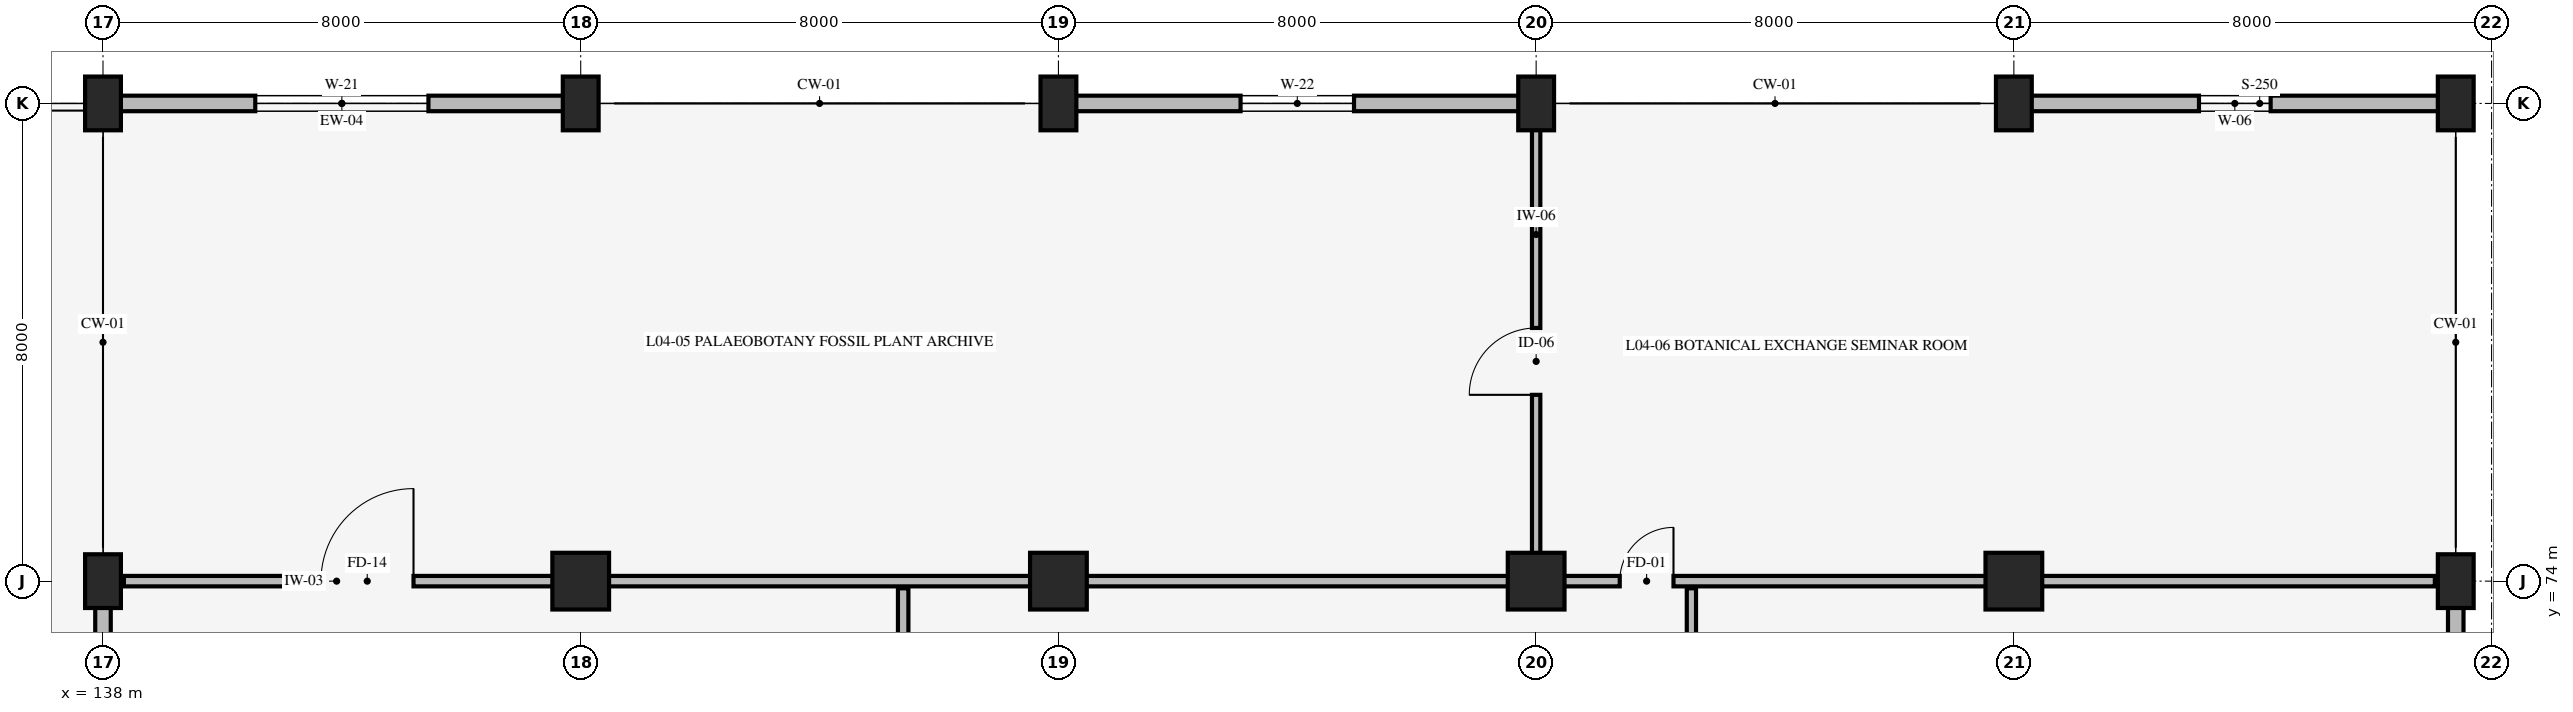
"""IFC4 building model, lengths in metres.
Left out: names, types, materials, properties, quantities, classifications, styles, units other than length and angle.
Written with IfcOpenShell. Run it as: python <this file> out.ifc"""

import sys

from ifc_helpers import new_model, si_unit, direction, frame, frame_2d, origin, origin_2d, place, context, subcontext, project, spatial, rectangle, extrude, element, fill, save


model = new_model("IFC4")
c1 = context("Model", 3, precision=1e-05, world=origin(), true_north=direction((0.0, 1.0)))
c2 = subcontext(c1, "Body", "Model", "MODEL_VIEW")
j1 = project(units=[si_unit("LENGTHUNIT", "METRE"), si_unit("PLANEANGLEUNIT", "RADIAN")], contexts=[c1])
p1 = place(None, origin())
s1 = spatial("IfcSite", under=j1, at=p1, CompositionType="ELEMENT")
p2 = place(p1, origin())
s2 = spatial("IfcBuilding", under=s1, at=p2, CompositionType="ELEMENT")
p3 = place(p2, frame((0.0, 0.0, 15.0)))
s3 = spatial("IfcBuildingStorey", under=s2, at=p3, CompositionType="ELEMENT", Elevation=15.0)
for number, where, z_axis, x_axis in (
    (1, (138.0, 74.0, 0.0), (0.0, 0.0, 1.0), (1.0, 0.0, 0.0)),
    (2, (138.0, 82.0, 0.0), (0.0, 0.0, 1.0), (1.0, 0.0, 0.0)),
):
    element("IfcColumn", number, at=place(p3, frame(where, z_axis=z_axis, x_axis=x_axis)), inside=s3, PredefinedType="COLUMN", context=c2, shape_type="SweptSolid", body=[
        extrude(rectangle(XDim=0.6, YDim=0.9, at=origin_2d()), origin(), (0.0, 0.0, 1.0), 4.2),
    ])
p4 = place(p3, frame((146.0, 74.0, 0.0), z_axis=(0.0, 0.0, 1.0), x_axis=(1.0, 0.0, 0.0)))
e3 = element("IfcColumn", 3, at=p4, inside=s3, PredefinedType="COLUMN", context=c2, shape_type="SweptSolid", body=[
    extrude(rectangle(XDim=0.95, YDim=0.95, at=origin_2d()), origin(), (0.0, 0.0, 1.0), 4.2),
])
p5 = place(p3, frame((146.0, 82.0, 0.0), z_axis=(0.0, 0.0, 1.0), x_axis=(1.0, 0.0, 0.0)))
e4 = element("IfcColumn", 4, at=p5, inside=s3, PredefinedType="COLUMN", context=c2, shape_type="SweptSolid", body=[
    extrude(rectangle(XDim=0.6, YDim=0.9, at=origin_2d()), origin(), (0.0, 0.0, 1.0), 4.2),
])
p6 = place(p3, frame((154.0, 74.0, 0.0), z_axis=(0.0, 0.0, 1.0), x_axis=(1.0, 0.0, 0.0)))
e5 = element("IfcColumn", 5, at=p6, inside=s3, PredefinedType="COLUMN", context=c2, shape_type="SweptSolid", body=[
    extrude(rectangle(XDim=0.95, YDim=0.95, at=origin_2d()), origin(), (0.0, 0.0, 1.0), 4.2),
])
p7 = place(p3, frame((154.0, 82.0, 0.0), z_axis=(0.0, 0.0, 1.0), x_axis=(1.0, 0.0, 0.0)))
e6 = element("IfcColumn", 6, at=p7, inside=s3, PredefinedType="COLUMN", context=c2, shape_type="SweptSolid", body=[
    extrude(rectangle(XDim=0.6, YDim=0.9, at=origin_2d()), origin(), (0.0, 0.0, 1.0), 4.2),
])
p8 = place(p3, frame((162.0, 74.0, 0.0), z_axis=(0.0, 0.0, 1.0), x_axis=(1.0, 0.0, 0.0)))
e7 = element("IfcColumn", 7, at=p8, inside=s3, PredefinedType="COLUMN", context=c2, shape_type="SweptSolid", body=[
    extrude(rectangle(XDim=0.95, YDim=0.95, at=origin_2d()), origin(), (0.0, 0.0, 1.0), 4.2),
])
p9 = place(p3, frame((162.0, 82.0, 0.0), z_axis=(0.0, 0.0, 1.0), x_axis=(1.0, 0.0, 0.0)))
e8 = element("IfcColumn", 8, at=p9, inside=s3, PredefinedType="COLUMN", context=c2, shape_type="SweptSolid", body=[
    extrude(rectangle(XDim=0.6, YDim=0.9, at=origin_2d()), origin(), (0.0, 0.0, 1.0), 4.2),
])
p10 = place(p3, frame((170.0, 74.0, 0.0), z_axis=(0.0, 0.0, 1.0), x_axis=(1.0, 0.0, 0.0)))
e9 = element("IfcColumn", 9, at=p10, inside=s3, PredefinedType="COLUMN", context=c2, shape_type="SweptSolid", body=[
    extrude(rectangle(XDim=0.95, YDim=0.95, at=origin_2d()), origin(), (0.0, 0.0, 1.0), 4.2),
])
for number, where, z_axis, x_axis in (
    (10, (170.0, 82.0, 0.0), (0.0, 0.0, 1.0), (1.0, 0.0, 0.0)),
    (11, (177.4, 74.0, 0.0), (0.0, 0.0, 1.0), (1.0, 0.0, 0.0)),
    (12, (177.4, 82.0, 0.0), (0.0, 0.0, 1.0), (1.0, 0.0, 0.0)),
):
    element("IfcColumn", number, at=place(p3, frame(where, z_axis=z_axis, x_axis=x_axis)), inside=s3, PredefinedType="COLUMN", context=c2, shape_type="SweptSolid", body=[
        extrude(rectangle(XDim=0.6, YDim=0.9, at=origin_2d()), origin(), (0.0, 0.0, 1.0), 4.2),
    ])
p11 = place(p3, frame((138.0, 66.0, 0.0), z_axis=(0.0, 0.0, 1.0), x_axis=(0.0, 1.0, 0.0)))
e13 = element("IfcWall", 13, at=p11, inside=s3, PredefinedType="STANDARD", context=c2, shape_type="SweptSolid", body=[
    extrude(rectangle(XDim=8.0, YDim=0.26, at=frame_2d((4.0, 0.0))), origin(), (0.0, 0.0, 1.0), 3.08),
])
p12 = place(p11, frame((2.65, 0.0, 0.85)))
e14 = element("IfcOpeningElement", 14, at=p12, cuts=e13, PredefinedType="OPENING", context=c2, shape_type="SweptSolid", body=[
    extrude(rectangle(XDim=2.7, YDim=1.8, at=frame_2d((1.35, 0.9))), frame((0.0, 0.14, 0.0), z_axis=(0.0, -1.0, 0.0), x_axis=(1.0, 0.0, 0.0)), (0.0, 0.0, 1.0), 0.28),
])
p13 = place(p3, frame((138.0, 82.0, 0.0), z_axis=(0.0, 0.0, 1.0), x_axis=(1.0, 0.0, 0.0)))
e15 = element("IfcWall", 15, at=p13, inside=s3, PredefinedType="STANDARD", context=c2, shape_type="SweptSolid", body=[
    extrude(rectangle(XDim=8.0, YDim=0.26, at=frame_2d((4.0, 0.0))), origin(), (0.0, 0.0, 1.0), 3.4),
])
p14 = place(p13, frame((2.55, 0.0, 0.85)))
e16 = element("IfcOpeningElement", 16, at=p14, cuts=e15, PredefinedType="OPENING", context=c2, shape_type="SweptSolid", body=[
    extrude(rectangle(XDim=2.9, YDim=1.7, at=frame_2d((1.45, 0.85))), frame((0.0, 0.14, 0.0), z_axis=(0.0, -1.0, 0.0), x_axis=(1.0, 0.0, 0.0)), (0.0, 0.0, 1.0), 0.28),
])
p15 = place(p3, frame((154.0, 82.0, 0.0), z_axis=(0.0, 0.0, 1.0), x_axis=(1.0, 0.0, 0.0)))
e17 = element("IfcWall", 17, at=p15, inside=s3, PredefinedType="STANDARD", context=c2, shape_type="SweptSolid", body=[
    extrude(rectangle(XDim=8.0, YDim=0.26, at=frame_2d((4.0, 0.0))), origin(), (0.0, 0.0, 1.0), 3.4),
])
p16 = place(p15, frame((3.05, 0.0, 0.85)))
e18 = element("IfcOpeningElement", 18, at=p16, cuts=e17, PredefinedType="OPENING", context=c2, shape_type="SweptSolid", body=[
    extrude(rectangle(XDim=1.9, YDim=1.3, at=frame_2d((0.95, 0.65))), frame((0.0, 0.14, 0.0), z_axis=(0.0, -1.0, 0.0), x_axis=(1.0, 0.0, 0.0)), (0.0, 0.0, 1.0), 0.28),
])
p17 = place(p3, frame((170.0, 82.0, 0.0), z_axis=(0.0, 0.0, 1.0), x_axis=(1.0, 0.0, 0.0)))
e19 = element("IfcWall", 19, at=p17, inside=s3, PredefinedType="STANDARD", context=c2, shape_type="SweptSolid", body=[
    extrude(rectangle(XDim=7.4, YDim=0.26, at=frame_2d((3.7, 0.0))), origin(), (0.0, 0.0, 1.0), 3.4),
])
p18 = place(p17, frame((3.1, 0.0, 0.85)))
e20 = element("IfcOpeningElement", 20, at=p18, cuts=e19, PredefinedType="OPENING", context=c2, shape_type="SweptSolid", body=[
    extrude(rectangle(XDim=1.2, YDim=1.2, at=frame_2d((0.6, 0.6))), frame((0.0, 0.14, 0.0), z_axis=(0.0, -1.0, 0.0), x_axis=(1.0, 0.0, 0.0)), (0.0, 0.0, 1.0), 0.28),
])
p19 = place(p3, frame((177.4, 74.0, 0.0), z_axis=(0.0, 0.0, 1.0), x_axis=(0.0, -1.0, 0.0)))
e21 = element("IfcWall", 21, at=p19, inside=s3, PredefinedType="STANDARD", context=c2, shape_type="SweptSolid", body=[
    extrude(rectangle(XDim=8.0, YDim=0.26, at=frame_2d((4.0, 0.0))), origin(), (0.0, 0.0, 1.0), 3.08),
])
p20 = place(p19, frame((3.35, 0.0, 0.85)))
e22 = element("IfcOpeningElement", 22, at=p20, cuts=e21, PredefinedType="OPENING", context=c2, shape_type="SweptSolid", body=[
    extrude(rectangle(XDim=1.3, YDim=1.7, at=frame_2d((0.65, 0.85))), frame((0.0, 0.14, 0.0), z_axis=(0.0, -1.0, 0.0), x_axis=(1.0, 0.0, 0.0)), (0.0, 0.0, 1.0), 0.28),
])
p21 = place(p3, frame((151.4, 54.12, 0.0), z_axis=(0.0, 0.0, 1.0), x_axis=(0.0, 1.0, 0.0)))
e23 = element("IfcWall", 23, at=p21, inside=s3, PredefinedType="STANDARD", context=c2, shape_type="SweptSolid", body=[
    extrude(rectangle(XDim=19.76, YDim=0.175, at=frame_2d((9.88, 0.0))), origin(), (0.0, 0.0, 1.0), 3.9),
])
p22 = place(p21, frame((9.28, 0.0, 0.0)))
e24 = element("IfcOpeningElement", 24, at=p22, cuts=e23, PredefinedType="OPENING", context=c2, shape_type="SweptSolid", body=[
    extrude(rectangle(XDim=1.2, YDim=2.1, at=frame_2d((0.6, 1.05))), frame((0.0, 0.098, 0.0), z_axis=(0.0, -1.0, 0.0), x_axis=(1.0, 0.0, 0.0)), (0.0, 0.0, 1.0), 0.195),
])
p23 = place(p3, frame((164.6, 58.08, 0.0), z_axis=(0.0, 0.0, 1.0), x_axis=(0.0, 1.0, 0.0)))
e25 = element("IfcWall", 25, at=p23, inside=s3, PredefinedType="STANDARD", context=c2, shape_type="SweptSolid", body=[
    extrude(rectangle(XDim=15.8, YDim=0.155, at=frame_2d((7.9, 0.0))), origin(), (0.0, 0.0, 1.0), 3.9),
])
p24 = place(p23, frame((7.2, 0.0, 0.0)))
e26 = element("IfcOpeningElement", 26, at=p24, cuts=e25, PredefinedType="OPENING", context=c2, shape_type="SweptSolid", body=[
    extrude(rectangle(XDim=1.4, YDim=2.2, at=frame_2d((0.7, 1.1))), frame((0.0, 0.087, 0.0), z_axis=(0.0, -1.0, 0.0), x_axis=(1.0, 0.0, 0.0)), (0.0, 0.0, 1.0), 0.175),
])
p25 = place(p3, frame((138.35, 74.0, 0.0), z_axis=(0.0, 0.0, 1.0), x_axis=(1.0, 0.0, 0.0)))
e27 = element("IfcWall", 27, at=p25, inside=s3, PredefinedType="STANDARD", context=c2, shape_type="SweptSolid", body=[
    extrude(rectangle(XDim=23.3, YDim=0.175, at=frame_2d((11.65, 0.0))), origin(), (0.0, 0.0, 1.0), 3.03),
])
p26 = place(p25, frame((3.3, 0.0, 0.0)))
e28 = element("IfcOpeningElement", 28, at=p26, cuts=e27, PredefinedType="OPENING", context=c2, shape_type="SweptSolid", body=[
    extrude(rectangle(XDim=1.55, YDim=2.25, at=frame_2d((0.775, 1.125))), frame((0.0, 0.098, 0.0), z_axis=(0.0, -1.0, 0.0), x_axis=(1.0, 0.0, 0.0)), (0.0, 0.0, 1.0), 0.195),
])
p27 = place(p3, frame((162.0, 74.12, 0.0), z_axis=(0.0, 0.0, 1.0), x_axis=(0.0, 1.0, 0.0)))
e29 = element("IfcWall", 29, at=p27, inside=s3, PredefinedType="STANDARD", context=c2, shape_type="SweptSolid", body=[
    extrude(rectangle(XDim=7.83, YDim=0.14, at=frame_2d((3.915, 0.0))), origin(), (0.0, 0.0, 1.0), 3.9),
])
p28 = place(p27, frame((3.0, 0.0, 0.0)))
e30 = element("IfcOpeningElement", 30, at=p28, cuts=e29, PredefinedType="OPENING", context=c2, shape_type="SweptSolid", body=[
    extrude(rectangle(XDim=1.12, YDim=2.12, at=frame_2d((0.56, 1.06))), frame((0.0, 0.08, 0.0), z_axis=(0.0, -1.0, 0.0), x_axis=(1.0, 0.0, 0.0)), (0.0, 0.0, 1.0), 0.16),
])
p29 = place(p3, frame((162.35, 74.0, 0.0), z_axis=(0.0, 0.0, 1.0), x_axis=(1.0, 0.0, 0.0)))
e31 = element("IfcWall", 31, at=p29, inside=s3, PredefinedType="STANDARD", context=c2, shape_type="SweptSolid", body=[
    extrude(rectangle(XDim=14.7, YDim=0.175, at=frame_2d((7.35, 0.0))), origin(), (0.0, 0.0, 1.0), 3.03),
])
p30 = place(p29, frame((1.05, 0.0, 0.0)))
e32 = element("IfcOpeningElement", 32, at=p30, cuts=e31, PredefinedType="OPENING", context=c2, shape_type="SweptSolid", body=[
    extrude(rectangle(XDim=0.9, YDim=2.1, at=frame_2d((0.45, 1.05))), frame((0.0, 0.098, 0.0), z_axis=(0.0, -1.0, 0.0), x_axis=(1.0, 0.0, 0.0)), (0.0, 0.0, 1.0), 0.195),
])
p31 = place(p14, origin())
e33 = element("IfcWindow", 33, at=p31, inside=s3, PartitioningType="SINGLE_PANEL", PredefinedType="WINDOW", context=c2, shape_type="SweptSolid", body=[
    extrude(rectangle(XDim=2.9, YDim=1.7, at=frame_2d((1.45, 0.85))), frame((0.0, 0.03, 0.0), z_axis=(0.0, -1.0, 0.0), x_axis=(1.0, 0.0, 0.0)), (0.0, 0.0, 1.0), 0.06),
])
fill(e16, e33)
p32 = place(p16, origin())
e34 = element("IfcWindow", 34, at=p32, inside=s3, PartitioningType="SINGLE_PANEL", PredefinedType="WINDOW", context=c2, shape_type="SweptSolid", body=[
    extrude(rectangle(XDim=1.9, YDim=1.3, at=frame_2d((0.95, 0.65))), frame((0.0, 0.03, 0.0), z_axis=(0.0, -1.0, 0.0), x_axis=(1.0, 0.0, 0.0)), (0.0, 0.0, 1.0), 0.06),
])
fill(e18, e34)
p33 = place(p18, origin())
e35 = element("IfcWindow", 35, at=p33, inside=s3, PartitioningType="SINGLE_PANEL", PredefinedType="WINDOW", context=c2, shape_type="SweptSolid", body=[
    extrude(rectangle(XDim=1.2, YDim=1.2, at=frame_2d((0.6, 0.6))), frame((0.0, 0.03, 0.0), z_axis=(0.0, -1.0, 0.0), x_axis=(1.0, 0.0, 0.0)), (0.0, 0.0, 1.0), 0.06),
])
fill(e20, e35)
p34 = place(p26, origin())
e36 = element("IfcDoor", 36, at=p34, inside=s3, OperationType="SINGLE_SWING_RIGHT", PredefinedType="DOOR", context=c2, shape_type="SweptSolid", body=[
    extrude(rectangle(XDim=1.55, YDim=2.25, at=frame_2d((0.775, 1.125))), frame((0.0, 0.025, 0.0), z_axis=(0.0, -1.0, 0.0), x_axis=(1.0, 0.0, 0.0)), (0.0, 0.0, 1.0), 0.05),
])
fill(e28, e36)
p35 = place(p28, origin())
e37 = element("IfcDoor", 37, at=p35, inside=s3, OperationType="SINGLE_SWING_LEFT", PredefinedType="DOOR", context=c2, shape_type="SweptSolid", body=[
    extrude(rectangle(XDim=1.12, YDim=2.12, at=frame_2d((0.56, 1.06))), frame((0.0, 0.025, 0.0), z_axis=(0.0, -1.0, 0.0), x_axis=(1.0, 0.0, 0.0)), (0.0, 0.0, 1.0), 0.05),
])
fill(e30, e37)
p36 = place(p30, origin())
e38 = element("IfcDoor", 38, at=p36, inside=s3, OperationType="SINGLE_SWING_RIGHT", PredefinedType="DOOR", context=c2, shape_type="SweptSolid", body=[
    extrude(rectangle(XDim=0.9, YDim=2.1, at=frame_2d((0.45, 1.05))), frame((0.0, 0.025, 0.0), z_axis=(0.0, -1.0, 0.0), x_axis=(1.0, 0.0, 0.0)), (0.0, 0.0, 1.0), 0.05),
])
fill(e32, e38)
save(model, sys.argv[1])
